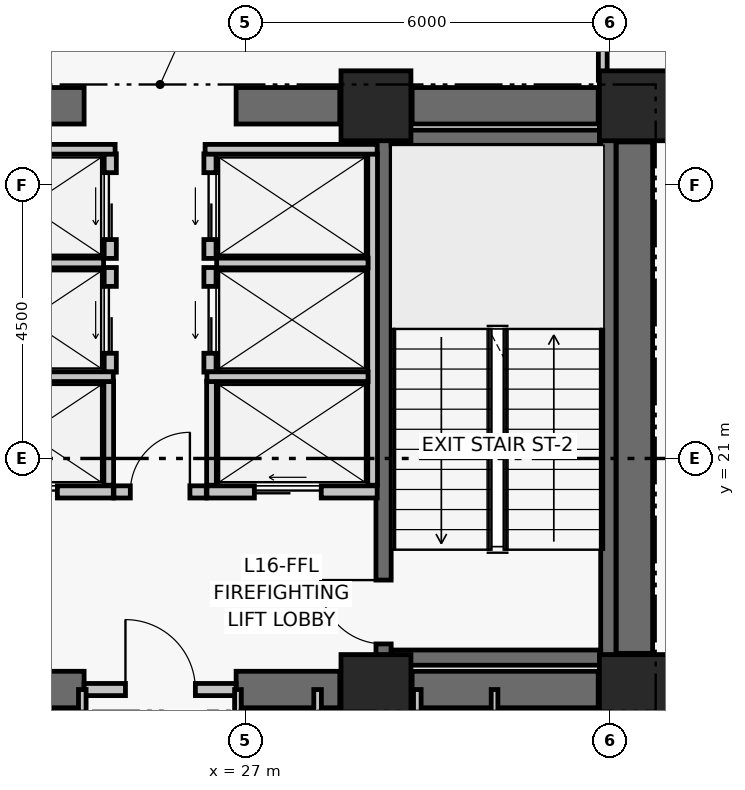
"""IFC4 building model, lengths in metres.
Left out: names, types, materials, properties, quantities, classifications, styles, units other than length and angle.
Written with IfcOpenShell. Run it as: python <this file> out.ifc"""

import sys

from ifc_helpers import new_model, si_unit, direction, frame, frame_2d, origin, origin_2d, place, context, subcontext, project, spatial, rectangle, extrude, element, fill, save


model = new_model("IFC4")
c1 = context("Model", 3, precision=1e-05, world=origin(), true_north=direction((0.0, 1.0)))
c2 = subcontext(c1, "Body", "Model", "MODEL_VIEW")
j1 = project(units=[si_unit("LENGTHUNIT", "METRE"), si_unit("PLANEANGLEUNIT", "RADIAN")], contexts=[c1])
p1 = place(None, origin())
s1 = spatial("IfcSite", under=j1, at=p1, CompositionType="ELEMENT")
p2 = place(p1, origin())
s2 = spatial("IfcBuilding", under=s1, at=p2, CompositionType="ELEMENT")
p3 = place(p2, frame((0.0, 0.0, 68.52)))
s3 = spatial("IfcBuildingStorey", under=s2, at=p3, CompositionType="ELEMENT", Elevation=68.52)
for number, where, z_axis, x_axis in (
    (1, (29.15, 17.2, 0.0), (0.0, 0.0, 1.0), (1.0, 0.0, 0.0)),
    (2, (33.4, 17.2, 0.0), (0.0, 0.0, 1.0), (1.0, 0.0, 0.0)),
    (3, (29.15, 26.8, 0.0), (0.0, 0.0, 1.0), (1.0, 0.0, 0.0)),
    (4, (33.4, 26.8, 0.0), (0.0, 0.0, 1.0), (1.0, 0.0, 0.0)),
):
    element("IfcColumn", number, at=place(p3, frame(where, z_axis=z_axis, x_axis=x_axis)), inside=s3, PredefinedType="COLUMN", context=c2, shape_type="SweptSolid", body=[
        extrude(rectangle(XDim=1.15, YDim=1.15, at=origin_2d()), origin(), (0.0, 0.0, 1.0), 3.72),
    ])
p4 = place(p3, frame((22.645, 17.2, 0.0), z_axis=(0.0, 0.0, 1.0), x_axis=(1.0, 0.0, 0.0)))
e5 = element("IfcWall", 5, at=p4, inside=s3, PredefinedType="SHEAR", context=c2, shape_type="SweptSolid", body=[
    extrude(rectangle(XDim=1.705, YDim=0.6, at=frame_2d((0.853, 0.0))), origin(), (0.0, 0.0, 1.0), 3.47),
])
p5 = place(p3, frame((26.85, 17.2, 0.0), z_axis=(0.0, 0.0, 1.0), x_axis=(1.0, 0.0, 0.0)))
e6 = element("IfcWall", 6, at=p5, inside=s3, PredefinedType="SHEAR", context=c2, shape_type="SweptSolid", body=[
    extrude(rectangle(XDim=1.705, YDim=0.6, at=frame_2d((0.853, 0.0))), origin(), (0.0, 0.0, 1.0), 3.47),
])
p6 = place(p3, frame((29.745, 17.2, 0.0), z_axis=(0.0, 0.0, 1.0), x_axis=(1.0, 0.0, 0.0)))
e7 = element("IfcWall", 7, at=p6, inside=s3, PredefinedType="SHEAR", context=c2, shape_type="SweptSolid", body=[
    extrude(rectangle(XDim=3.06, YDim=0.6, at=frame_2d((1.53, 0.0))), origin(), (0.0, 0.0, 1.0), 3.47),
])
p7 = place(p3, frame((22.645, 26.8, 0.0), z_axis=(0.0, 0.0, 1.0), x_axis=(1.0, 0.0, 0.0)))
e8 = element("IfcWall", 8, at=p7, inside=s3, PredefinedType="SHEAR", context=c2, shape_type="SweptSolid", body=[
    extrude(rectangle(XDim=1.705, YDim=0.6, at=frame_2d((0.853, 0.0))), origin(), (0.0, 0.0, 1.0), 3.47),
])
p8 = place(p3, frame((26.85, 26.8, 0.0), z_axis=(0.0, 0.0, 1.0), x_axis=(1.0, 0.0, 0.0)))
e9 = element("IfcWall", 9, at=p8, inside=s3, PredefinedType="SHEAR", context=c2, shape_type="SweptSolid", body=[
    extrude(rectangle(XDim=1.705, YDim=0.6, at=frame_2d((0.853, 0.0))), origin(), (0.0, 0.0, 1.0), 3.47),
])
p9 = place(p3, frame((29.745, 26.8, 0.0), z_axis=(0.0, 0.0, 1.0), x_axis=(1.0, 0.0, 0.0)))
e10 = element("IfcWall", 10, at=p9, inside=s3, PredefinedType="SHEAR", context=c2, shape_type="SweptSolid", body=[
    extrude(rectangle(XDim=3.06, YDim=0.6, at=frame_2d((1.53, 0.0))), origin(), (0.0, 0.0, 1.0), 3.47),
])
p10 = place(p3, frame((33.4, 17.795, 0.0), z_axis=(0.0, 0.0, 1.0), x_axis=(0.0, 1.0, 0.0)))
e11 = element("IfcWall", 11, at=p10, inside=s3, PredefinedType="SHEAR", context=c2, shape_type="SweptSolid", body=[
    extrude(rectangle(XDim=8.41, YDim=0.6, at=frame_2d((4.205, 0.0))), origin(), (0.0, 0.0, 1.0), 3.47),
])
p11 = place(p3, frame((29.275, 17.6, 0.0), z_axis=(0.0, 0.0, 1.0), x_axis=(0.0, 1.0, 0.0)))
e12 = element("IfcWall", 12, at=p11, inside=s3, PredefinedType="SHEAR", context=c2, shape_type="SweptSolid", body=[
    extrude(rectangle(XDim=8.8, YDim=0.25, at=frame_2d((4.4, 0.0))), origin(), (0.0, 0.0, 1.0), 3.47),
])
p12 = place(p11, frame((0.35, 0.0, 0.0)))
e13 = element("IfcOpeningElement", 13, at=p12, cuts=e12, PredefinedType="OPENING", context=c2, shape_type="SweptSolid", body=[
    extrude(rectangle(XDim=1.05, YDim=2.08, at=frame_2d((0.525, 1.04))), frame((0.0, 0.135, 0.0), z_axis=(0.0, -1.0, 0.0), x_axis=(1.0, 0.0, 0.0)), (0.0, 0.0, 1.0), 0.27),
])
p13 = place(p3, frame((32.971, 17.6, 0.0), z_axis=(0.0, 0.0, 1.0), x_axis=(0.0, 1.0, 0.0)))
e14 = element("IfcWall", 14, at=p13, inside=s3, PredefinedType="SHEAR", context=c2, shape_type="SweptSolid", body=[
    extrude(rectangle(XDim=8.8, YDim=0.25, at=frame_2d((4.4, 0.0))), origin(), (0.0, 0.0, 1.0), 3.47),
])
for number, where, z_axis, x_axis in (
    (15, (29.4, 17.725, 0.0), (0.0, 0.0, 1.0), (1.0, 0.0, 0.0)),
    (16, (29.4, 26.275, 0.0), (0.0, 0.0, 1.0), (1.0, 0.0, 0.0)),
):
    element("IfcWall", number, at=place(p3, frame(where, z_axis=z_axis, x_axis=x_axis)), inside=s3, PredefinedType="SHEAR", context=c2, shape_type="SweptSolid", body=[
        extrude(rectangle(XDim=3.446, YDim=0.25, at=frame_2d((1.723, 0.0))), origin(), (0.0, 0.0, 1.0), 3.47),
    ])
p14 = place(p3, frame((24.35, 17.2, 0.0), z_axis=(0.0, 0.0, 1.0), x_axis=(1.0, 0.0, 0.0)))
e17 = element("IfcWall", 17, at=p14, inside=s3, PredefinedType="PARTITIONING", context=c2, shape_type="SweptSolid", body=[
    extrude(rectangle(XDim=2.5, YDim=0.2, at=frame_2d((1.25, 0.0))), origin(), (0.0, 0.0, 1.0), 2.6),
])
p15 = place(p14, frame((0.68, 0.0, 0.0)))
e18 = element("IfcOpeningElement", 18, at=p15, cuts=e17, PredefinedType="OPENING", context=c2, shape_type="SweptSolid", body=[
    extrude(rectangle(XDim=1.15, YDim=2.08, at=frame_2d((0.575, 1.04))), frame((0.0, 0.11, 0.0), z_axis=(0.0, -1.0, 0.0), x_axis=(1.0, 0.0, 0.0)), (0.0, 0.0, 1.0), 0.22),
])
p16 = place(p3, frame((24.84, 20.45, 0.0), z_axis=(0.0, 0.0, 1.0), x_axis=(1.0, 0.0, 0.0)))
e19 = element("IfcWall", 19, at=p16, inside=s3, PredefinedType="PARTITIONING", context=c2, shape_type="SweptSolid", body=[
    extrude(rectangle(XDim=1.52, YDim=0.2, at=frame_2d((0.76, 0.0))), origin(), (0.0, 0.0, 1.0), 3.47),
])
p17 = place(p16, frame((0.27, 0.0, 0.0)))
e20 = element("IfcOpeningElement", 20, at=p17, cuts=e19, PredefinedType="OPENING", context=c2, shape_type="SweptSolid", body=[
    extrude(rectangle(XDim=0.98, YDim=2.06, at=frame_2d((0.49, 1.03))), frame((0.0, 0.11, 0.0), z_axis=(0.0, -1.0, 0.0), x_axis=(1.0, 0.0, 0.0)), (0.0, 0.0, 1.0), 0.22),
])
p18 = place(p3, frame((22.03, 20.45, 0.0), z_axis=(0.0, 0.0, 1.0), x_axis=(1.0, 0.0, 0.0)))
e21 = element("IfcWall", 21, at=p18, inside=s3, PredefinedType="PARTITIONING", context=c2, shape_type="SweptSolid", body=[
    extrude(rectangle(XDim=2.8, YDim=0.2, at=frame_2d((1.4, 0.0))), origin(), (0.0, 0.0, 1.0), 3.47),
])
p19 = place(p18, frame((0.78, 0.0, 0.0)))
e22 = element("IfcOpeningElement", 22, at=p19, cuts=e21, PredefinedType="OPENING", context=c2, shape_type="SweptSolid", body=[
    extrude(rectangle(XDim=1.1, YDim=2.08, at=frame_2d((0.55, 1.04))), frame((0.0, 0.11, 0.0), z_axis=(0.0, -1.0, 0.0), x_axis=(1.0, 0.0, 0.0)), (0.0, 0.0, 1.0), 0.22),
])
p20 = place(p3, frame((26.37, 20.45, 0.0), z_axis=(0.0, 0.0, 1.0), x_axis=(1.0, 0.0, 0.0)))
e23 = element("IfcWall", 23, at=p20, inside=s3, PredefinedType="PARTITIONING", context=c2, shape_type="SweptSolid", body=[
    extrude(rectangle(XDim=2.8, YDim=0.2, at=frame_2d((1.4, 0.0))), origin(), (0.0, 0.0, 1.0), 3.47),
])
p21 = place(p20, frame((0.78, 0.0, 0.0)))
e24 = element("IfcOpeningElement", 24, at=p21, cuts=e23, PredefinedType="OPENING", context=c2, shape_type="SweptSolid", body=[
    extrude(rectangle(XDim=1.1, YDim=2.08, at=frame_2d((0.55, 1.04))), frame((0.0, 0.11, 0.0), z_axis=(0.0, -1.0, 0.0), x_axis=(1.0, 0.0, 0.0)), (0.0, 0.0, 1.0), 0.22),
])
p22 = place(p3, frame((24.78, 22.42, 0.0), z_axis=(0.0, 0.0, 1.0), x_axis=(0.0, 1.0, 0.0)))
e25 = element("IfcWall", 25, at=p22, inside=s3, PredefinedType="PARTITIONING", context=c2, shape_type="SweptSolid", body=[
    extrude(rectangle(XDim=1.72, YDim=0.2, at=frame_2d((0.86, 0.0))), origin(), (0.0, 0.0, 1.0), 3.47),
])
p23 = place(p22, frame((0.31, 0.0, 0.0)))
e26 = element("IfcOpeningElement", 26, at=p23, cuts=e25, PredefinedType="OPENING", context=c2, shape_type="SweptSolid", body=[
    extrude(rectangle(XDim=1.1, YDim=2.08, at=frame_2d((0.55, 1.04))), frame((0.0, 0.11, 0.0), z_axis=(0.0, -1.0, 0.0), x_axis=(1.0, 0.0, 0.0)), (0.0, 0.0, 1.0), 0.22),
])
p24 = place(p3, frame((24.78, 24.29, 0.0), z_axis=(0.0, 0.0, 1.0), x_axis=(0.0, 1.0, 0.0)))
e27 = element("IfcWall", 27, at=p24, inside=s3, PredefinedType="PARTITIONING", context=c2, shape_type="SweptSolid", body=[
    extrude(rectangle(XDim=1.72, YDim=0.2, at=frame_2d((0.86, 0.0))), origin(), (0.0, 0.0, 1.0), 3.47),
])
p25 = place(p24, frame((0.31, 0.0, 0.0)))
e28 = element("IfcOpeningElement", 28, at=p25, cuts=e27, PredefinedType="OPENING", context=c2, shape_type="SweptSolid", body=[
    extrude(rectangle(XDim=1.1, YDim=2.08, at=frame_2d((0.55, 1.04))), frame((0.0, 0.11, 0.0), z_axis=(0.0, -1.0, 0.0), x_axis=(1.0, 0.0, 0.0)), (0.0, 0.0, 1.0), 0.22),
])
p26 = place(p3, frame((26.42, 22.42, 0.0), z_axis=(0.0, 0.0, 1.0), x_axis=(0.0, 1.0, 0.0)))
e29 = element("IfcWall", 29, at=p26, inside=s3, PredefinedType="PARTITIONING", context=c2, shape_type="SweptSolid", body=[
    extrude(rectangle(XDim=1.72, YDim=0.2, at=frame_2d((0.86, 0.0))), origin(), (0.0, 0.0, 1.0), 3.47),
])
p27 = place(p26, frame((0.31, 0.0, 0.0)))
e30 = element("IfcOpeningElement", 30, at=p27, cuts=e29, PredefinedType="OPENING", context=c2, shape_type="SweptSolid", body=[
    extrude(rectangle(XDim=1.1, YDim=2.08, at=frame_2d((0.55, 1.04))), frame((0.0, 0.11, 0.0), z_axis=(0.0, -1.0, 0.0), x_axis=(1.0, 0.0, 0.0)), (0.0, 0.0, 1.0), 0.22),
])
p28 = place(p3, frame((26.42, 24.29, 0.0), z_axis=(0.0, 0.0, 1.0), x_axis=(0.0, 1.0, 0.0)))
e31 = element("IfcWall", 31, at=p28, inside=s3, PredefinedType="PARTITIONING", context=c2, shape_type="SweptSolid", body=[
    extrude(rectangle(XDim=1.72, YDim=0.2, at=frame_2d((0.86, 0.0))), origin(), (0.0, 0.0, 1.0), 3.47),
])
p29 = place(p28, frame((0.31, 0.0, 0.0)))
e32 = element("IfcOpeningElement", 32, at=p29, cuts=e31, PredefinedType="OPENING", context=c2, shape_type="SweptSolid", body=[
    extrude(rectangle(XDim=1.1, YDim=2.08, at=frame_2d((0.55, 1.04))), frame((0.0, 0.11, 0.0), z_axis=(0.0, -1.0, 0.0), x_axis=(1.0, 0.0, 0.0)), (0.0, 0.0, 1.0), 0.22),
])
p30 = place(p3, frame((24.755, 20.56, 0.0), z_axis=(0.0, 0.0, 1.0), x_axis=(0.0, 1.0, 0.0)))
e33 = element("IfcWall", 33, at=p30, inside=s3, PredefinedType="PARTITIONING", context=c2, shape_type="SweptSolid", body=[
    extrude(rectangle(XDim=1.71, YDim=0.16, at=frame_2d((0.855, 0.0))), origin(), (0.0, 0.0, 1.0), 3.47),
])
p31 = place(p3, frame((22.18, 22.345, 0.0), z_axis=(0.0, 0.0, 1.0), x_axis=(1.0, 0.0, 0.0)))
e34 = element("IfcWall", 34, at=p31, inside=s3, PredefinedType="PARTITIONING", context=c2, shape_type="SweptSolid", body=[
    extrude(rectangle(XDim=2.65, YDim=0.16, at=frame_2d((1.325, 0.0))), origin(), (0.0, 0.0, 1.0), 3.47),
])
p32 = place(p3, frame((22.18, 24.215, 0.0), z_axis=(0.0, 0.0, 1.0), x_axis=(1.0, 0.0, 0.0)))
e35 = element("IfcWall", 35, at=p32, inside=s3, PredefinedType="PARTITIONING", context=c2, shape_type="SweptSolid", body=[
    extrude(rectangle(XDim=2.49, YDim=0.16, at=frame_2d((1.245, 0.0))), origin(), (0.0, 0.0, 1.0), 3.47),
])
p33 = place(p3, frame((22.03, 26.085, 0.0), z_axis=(0.0, 0.0, 1.0), x_axis=(1.0, 0.0, 0.0)))
e36 = element("IfcWall", 36, at=p33, inside=s3, PredefinedType="PARTITIONING", context=c2, shape_type="SweptSolid", body=[
    extrude(rectangle(XDim=2.83, YDim=0.16, at=frame_2d((1.415, 0.0))), origin(), (0.0, 0.0, 1.0), 3.47),
])
p34 = place(p3, frame((29.095, 20.56, 0.0), z_axis=(0.0, 0.0, 1.0), x_axis=(0.0, 1.0, 0.0)))
e37 = element("IfcWall", 37, at=p34, inside=s3, PredefinedType="PARTITIONING", context=c2, shape_type="SweptSolid", body=[
    extrude(rectangle(XDim=5.45, YDim=0.16, at=frame_2d((2.725, 0.0))), origin(), (0.0, 0.0, 1.0), 3.47),
])
p35 = place(p3, frame((26.445, 20.56, 0.0), z_axis=(0.0, 0.0, 1.0), x_axis=(0.0, 1.0, 0.0)))
e38 = element("IfcWall", 38, at=p35, inside=s3, PredefinedType="PARTITIONING", context=c2, shape_type="SweptSolid", body=[
    extrude(rectangle(XDim=1.71, YDim=0.16, at=frame_2d((0.855, 0.0))), origin(), (0.0, 0.0, 1.0), 3.47),
])
p36 = place(p3, frame((26.37, 22.345, 0.0), z_axis=(0.0, 0.0, 1.0), x_axis=(1.0, 0.0, 0.0)))
e39 = element("IfcWall", 39, at=p36, inside=s3, PredefinedType="PARTITIONING", context=c2, shape_type="SweptSolid", body=[
    extrude(rectangle(XDim=2.65, YDim=0.16, at=frame_2d((1.325, 0.0))), origin(), (0.0, 0.0, 1.0), 3.47),
])
p37 = place(p3, frame((26.53, 24.215, 0.0), z_axis=(0.0, 0.0, 1.0), x_axis=(1.0, 0.0, 0.0)))
e40 = element("IfcWall", 40, at=p37, inside=s3, PredefinedType="PARTITIONING", context=c2, shape_type="SweptSolid", body=[
    extrude(rectangle(XDim=2.49, YDim=0.16, at=frame_2d((1.245, 0.0))), origin(), (0.0, 0.0, 1.0), 3.47),
])
p38 = place(p3, frame((26.34, 26.085, 0.0), z_axis=(0.0, 0.0, 1.0), x_axis=(1.0, 0.0, 0.0)))
e41 = element("IfcWall", 41, at=p38, inside=s3, PredefinedType="PARTITIONING", context=c2, shape_type="SweptSolid", body=[
    extrude(rectangle(XDim=2.83, YDim=0.16, at=frame_2d((1.415, 0.0))), origin(), (0.0, 0.0, 1.0), 3.47),
])
p39 = place(p3, frame((24.32, 14.95, 0.0), z_axis=(0.0, 0.0, 1.0), x_axis=(0.0, 1.0, 0.0)))
e42 = element("IfcWall", 42, at=p39, inside=s3, PredefinedType="PARTITIONING", context=c2, shape_type="SweptSolid", body=[
    extrude(rectangle(XDim=2.25, YDim=0.125, at=frame_2d((1.125, 0.0))), origin(), (0.0, 0.0, 1.0), 2.6),
])
p40 = place(p3, frame((26.88, 14.95, 0.0), z_axis=(0.0, 0.0, 1.0), x_axis=(0.0, 1.0, 0.0)))
e43 = element("IfcWall", 43, at=p40, inside=s3, PredefinedType="PARTITIONING", context=c2, shape_type="SweptSolid", body=[
    extrude(rectangle(XDim=2.25, YDim=0.11, at=frame_2d((1.125, 0.0))), origin(), (0.0, 0.0, 1.0), 2.6),
])
for number, where, z_axis, x_axis in (
    (44, (28.19, 14.95, 0.0), (0.0, 0.0, 1.0), (0.0, 1.0, 0.0)),
    (45, (29.83, 14.95, 0.0), (0.0, 0.0, 1.0), (0.0, 1.0, 0.0)),
):
    element("IfcWall", number, at=place(p3, frame(where, z_axis=z_axis, x_axis=x_axis)), inside=s3, PredefinedType="PARTITIONING", context=c2, shape_type="SweptSolid", body=[
        extrude(rectangle(XDim=2.25, YDim=0.125, at=frame_2d((1.125, 0.0))), origin(), (0.0, 0.0, 1.0), 2.6),
    ])
p41 = place(p3, frame((31.1, 14.95, 0.0), z_axis=(0.0, 0.0, 1.0), x_axis=(0.0, 1.0, 0.0)))
e46 = element("IfcWall", 46, at=p41, inside=s3, PredefinedType="PARTITIONING", context=c2, shape_type="SweptSolid", body=[
    extrude(rectangle(XDim=2.25, YDim=0.11, at=frame_2d((1.125, 0.0))), origin(), (0.0, 0.0, 1.0), 2.6),
])
p42 = place(p3, frame((33.74, 27.22, 0.0), z_axis=(0.0, 0.0, 1.0), x_axis=(-1.0, 0.0, 0.0)))
e47 = element("IfcWall", 47, at=p42, inside=s3, PredefinedType="PARTITIONING", context=c2, shape_type="SweptSolid", body=[
    extrude(rectangle(XDim=0.86, YDim=0.145, at=frame_2d((0.43, 0.0))), origin(), (0.0, 0.0, 1.0), 2.2),
])
p43 = place(p3, frame((32.88, 27.22, 0.0), z_axis=(0.0, 0.0, 1.0), x_axis=(0.0, 1.0, 0.0)))
e48 = element("IfcWall", 48, at=p43, inside=s3, PredefinedType="PARTITIONING", context=c2, shape_type="SweptSolid", body=[
    extrude(rectangle(XDim=1.175, YDim=0.145, at=frame_2d((0.587, 0.0))), origin(), (0.0, 0.0, 1.0), 2.6),
])
p44 = place(p12, origin())
e49 = element("IfcDoor", 49, at=p44, inside=s3, OperationType="SINGLE_SWING_RIGHT", PredefinedType="DOOR", context=c2, shape_type="SweptSolid", body=[
    extrude(rectangle(XDim=1.05, YDim=2.08, at=frame_2d((0.525, 1.04))), frame((0.0, 0.025, 0.0), z_axis=(0.0, -1.0, 0.0), x_axis=(1.0, 0.0, 0.0)), (0.0, 0.0, 1.0), 0.05),
])
fill(e13, e49)
p45 = place(p15, origin())
e50 = element("IfcDoor", 50, at=p45, inside=s3, OperationType="SINGLE_SWING_LEFT", PredefinedType="DOOR", context=c2, shape_type="SweptSolid", body=[
    extrude(rectangle(XDim=1.15, YDim=2.08, at=frame_2d((0.575, 1.04))), frame((0.0, 0.025, 0.0), z_axis=(0.0, -1.0, 0.0), x_axis=(1.0, 0.0, 0.0)), (0.0, 0.0, 1.0), 0.05),
])
fill(e18, e50)
p46 = place(p17, origin())
e51 = element("IfcDoor", 51, at=p46, inside=s3, OperationType="SINGLE_SWING_RIGHT", PredefinedType="DOOR", context=c2, shape_type="SweptSolid", body=[
    extrude(rectangle(XDim=0.98, YDim=2.06, at=frame_2d((0.49, 1.03))), frame((0.0, 0.025, 0.0), z_axis=(0.0, -1.0, 0.0), x_axis=(1.0, 0.0, 0.0)), (0.0, 0.0, 1.0), 0.05),
])
fill(e20, e51)
p47 = place(p19, origin())
e52 = element("IfcDoor", 52, at=p47, inside=s3, OperationType="DOUBLE_DOOR_SLIDING", PredefinedType="DOOR", context=c2, shape_type="SweptSolid", body=[
    extrude(rectangle(XDim=1.1, YDim=2.08, at=frame_2d((0.55, 1.04))), frame((0.0, 0.025, 0.0), z_axis=(0.0, -1.0, 0.0), x_axis=(1.0, 0.0, 0.0)), (0.0, 0.0, 1.0), 0.05),
])
fill(e22, e52)
p48 = place(p21, origin())
e53 = element("IfcDoor", 53, at=p48, inside=s3, OperationType="DOUBLE_DOOR_SLIDING", PredefinedType="DOOR", context=c2, shape_type="SweptSolid", body=[
    extrude(rectangle(XDim=1.1, YDim=2.08, at=frame_2d((0.55, 1.04))), frame((0.0, 0.025, 0.0), z_axis=(0.0, -1.0, 0.0), x_axis=(1.0, 0.0, 0.0)), (0.0, 0.0, 1.0), 0.05),
])
fill(e24, e53)
p49 = place(p23, origin())
e54 = element("IfcDoor", 54, at=p49, inside=s3, OperationType="DOUBLE_DOOR_SLIDING", PredefinedType="DOOR", context=c2, shape_type="SweptSolid", body=[
    extrude(rectangle(XDim=1.1, YDim=2.08, at=frame_2d((0.55, 1.04))), frame((0.0, 0.025, 0.0), z_axis=(0.0, -1.0, 0.0), x_axis=(1.0, 0.0, 0.0)), (0.0, 0.0, 1.0), 0.05),
])
fill(e26, e54)
p50 = place(p25, origin())
e55 = element("IfcDoor", 55, at=p50, inside=s3, OperationType="DOUBLE_DOOR_SLIDING", PredefinedType="DOOR", context=c2, shape_type="SweptSolid", body=[
    extrude(rectangle(XDim=1.1, YDim=2.08, at=frame_2d((0.55, 1.04))), frame((0.0, 0.025, 0.0), z_axis=(0.0, -1.0, 0.0), x_axis=(1.0, 0.0, 0.0)), (0.0, 0.0, 1.0), 0.05),
])
fill(e28, e55)
p51 = place(p27, origin())
e56 = element("IfcDoor", 56, at=p51, inside=s3, OperationType="DOUBLE_DOOR_SLIDING", PredefinedType="DOOR", context=c2, shape_type="SweptSolid", body=[
    extrude(rectangle(XDim=1.1, YDim=2.08, at=frame_2d((0.55, 1.04))), frame((0.0, 0.025, 0.0), z_axis=(0.0, -1.0, 0.0), x_axis=(1.0, 0.0, 0.0)), (0.0, 0.0, 1.0), 0.05),
])
fill(e30, e56)
p52 = place(p29, origin())
e57 = element("IfcDoor", 57, at=p52, inside=s3, OperationType="DOUBLE_DOOR_SLIDING", PredefinedType="DOOR", context=c2, shape_type="SweptSolid", body=[
    extrude(rectangle(XDim=1.1, YDim=2.08, at=frame_2d((0.55, 1.04))), frame((0.0, 0.025, 0.0), z_axis=(0.0, -1.0, 0.0), x_axis=(1.0, 0.0, 0.0)), (0.0, 0.0, 1.0), 0.05),
])
fill(e32, e57)
save(model, sys.argv[1])
